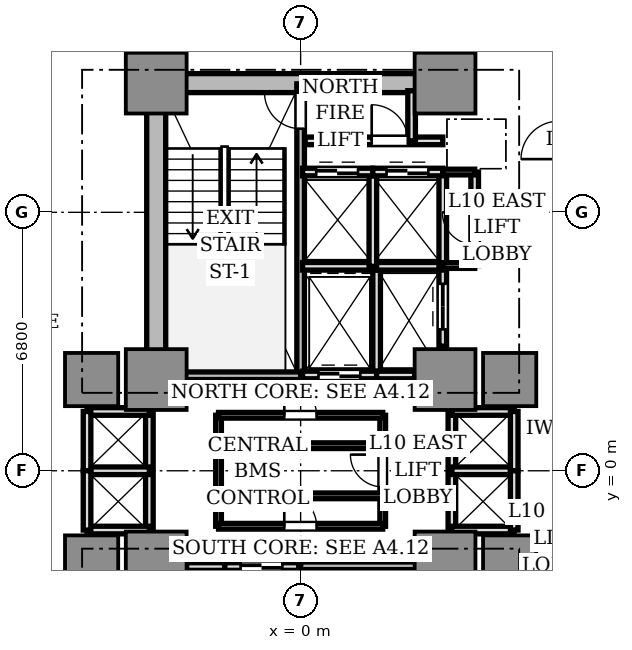
"""IFC4 building model, lengths in metres.
Left out: names, types, materials, properties, quantities, classifications, styles, units other than length and angle.
Written with IfcOpenShell. Run it as: python <this file> out.ifc"""

import sys

from ifc_helpers import new_model, si_unit, direction, frame, frame_2d, origin, origin_2d, place, context, subcontext, project, spatial, rectangle, extrude, source, transform, mapped, element, fill, save


model = new_model("IFC4")
c1 = context("Model", 3, precision=1e-05, world=origin(), true_north=direction((0.0, 1.0)))
c2 = subcontext(c1, "Body", "Model", "MODEL_VIEW")
j1 = project(units=[si_unit("LENGTHUNIT", "METRE"), si_unit("PLANEANGLEUNIT", "RADIAN")], contexts=[c1])
p1 = place(None, origin())
s1 = spatial("IfcSite", under=j1, at=p1, CompositionType="ELEMENT")
p2 = place(p1, origin())
s2 = spatial("IfcBuilding", under=s1, at=p2, CompositionType="ELEMENT")
p3 = place(p2, frame((0.0, 0.0, 39.85)))
s3 = spatial("IfcBuildingStorey", under=s2, at=p3, CompositionType="ELEMENT", Elevation=39.85)
p4 = place(p3, frame((-3.55, 10.2, 0.0), z_axis=(0.0, 0.0, 1.0), x_axis=(1.0, 0.0, 0.0)))
e1 = element("IfcWall", 1, at=p4, inside=s3, PredefinedType="SHEAR", context=c2, shape_type="SweptSolid", body=[
    extrude(rectangle(XDim=7.1, YDim=0.5, at=frame_2d((3.55, 0.0))), origin(), (0.0, 0.0, 1.0), 3.11),
])
p5 = place(p3, frame((-3.8, 2.85, 0.0), z_axis=(0.0, 0.0, 1.0), x_axis=(0.0, 1.0, 0.0)))
e2 = element("IfcWall", 2, at=p5, inside=s3, PredefinedType="SHEAR", context=c2, shape_type="SweptSolid", body=[
    extrude(rectangle(XDim=6.9, YDim=0.5, at=frame_2d((3.45, 0.0))), origin(), (0.0, 0.0, 1.0), 3.11),
])
m1 = source(origin(), c2, "Body", "SweptSolid", [
    extrude(rectangle(XDim=1.6, YDim=1.6, at=origin_2d()), origin(), (0.0, 0.0, 1.0), 3.11),
])
for number, where, z_axis, x_axis in (
    (3, (-3.8, 2.4, 0.0), (0.0, 0.0, 1.0), (1.0, 0.0, 0.0)),
    (4, (3.8, 2.4, 0.0), (0.0, 0.0, 1.0), (1.0, 0.0, 0.0)),
    (5, (-3.8, 10.2, 0.0), (0.0, 0.0, 1.0), (1.0, 0.0, 0.0)),
    (6, (3.8, 10.2, 0.0), (0.0, 0.0, 1.0), (1.0, 0.0, 0.0)),
    (7, (-3.8, -2.4, 0.0), (0.0, 0.0, 1.0), (1.0, 0.0, 0.0)),
    (8, (3.8, -2.4, 0.0), (0.0, 0.0, 1.0), (1.0, 0.0, 0.0)),
):
    element("IfcColumn", number, at=place(p3, frame(where, z_axis=z_axis, x_axis=x_axis)), inside=s3, PredefinedType="COLUMN", context=c2, shape_type="MappedRepresentation", body=[
        mapped(m1, transform((0.0, 0.0, 0.0), scale=1.0)),
    ])
m2 = source(origin(), c2, "Body", "SweptSolid", [
    extrude(rectangle(XDim=1.4, YDim=1.4, at=origin_2d()), origin(), (0.0, 0.0, 1.0), 3.11),
])
for number, where, z_axis, x_axis in (
    (9, (5.5, 2.4, 0.0), (0.0, 0.0, 1.0), (1.0, 0.0, 0.0)),
    (10, (-5.5, 2.4, 0.0), (0.0, 0.0, 1.0), (1.0, 0.0, 0.0)),
    (11, (5.5, -2.4, 0.0), (0.0, 0.0, 1.0), (1.0, 0.0, 0.0)),
    (12, (-5.5, -2.4, 0.0), (0.0, 0.0, 1.0), (1.0, 0.0, 0.0)),
):
    element("IfcColumn", number, at=place(p3, frame(where, z_axis=z_axis, x_axis=x_axis)), inside=s3, PredefinedType="COLUMN", context=c2, shape_type="MappedRepresentation", body=[
        mapped(m2, transform((0.0, 0.0, 0.0), scale=1.0)),
    ])
p6 = place(p3, frame((0.0, 2.5, 0.0), z_axis=(0.0, 0.0, 1.0), x_axis=(0.0, 1.0, 0.0)))
e13 = element("IfcWall", 13, at=p6, inside=s3, PredefinedType="SOLIDWALL", context=c2, shape_type="SweptSolid", body=[
    extrude(rectangle(XDim=7.68, YDim=0.2, at=frame_2d((3.84, 0.0))), origin(), (0.0, 0.0, 1.0), 3.11),
])
p7 = place(p6, frame((6.5, 0.0, 0.0)))
e14 = element("IfcOpeningElement", 14, at=p7, cuts=e13, PredefinedType="OPENING", context=c2, shape_type="SweptSolid", body=[
    extrude(rectangle(XDim=0.95, YDim=2.15, at=frame_2d((0.475, 1.075))), frame((0.0, 0.11, 0.0), z_axis=(0.0, -1.0, 0.0), x_axis=(1.0, 0.0, 0.0)), (0.0, 0.0, 1.0), 0.22),
])
p8 = place(p3, frame((-3.72, 2.5, 0.0), z_axis=(0.0, 0.0, 1.0), x_axis=(1.0, 0.0, 0.0)))
e15 = element("IfcWall", 15, at=p8, inside=s3, PredefinedType="SOLIDWALL", context=c2, shape_type="SweptSolid", body=[
    extrude(rectangle(XDim=3.72, YDim=0.2, at=frame_2d((1.86, 0.0))), origin(), (0.0, 0.0, 1.0), 3.11),
])
p9 = place(p3, frame((0.0, -10.18, 0.0), z_axis=(0.0, 0.0, 1.0), x_axis=(0.0, 1.0, 0.0)))
e16 = element("IfcWall", 16, at=p9, inside=s3, PredefinedType="SOLIDWALL", context=c2, shape_type="SweptSolid", body=[
    extrude(rectangle(XDim=7.68, YDim=0.2, at=frame_2d((3.84, 0.0))), origin(), (0.0, 0.0, 1.0), 3.11),
])
p10 = place(p9, frame((0.28, 0.0, 0.0)))
e17 = element("IfcOpeningElement", 17, at=p10, cuts=e16, PredefinedType="OPENING", context=c2, shape_type="SweptSolid", body=[
    extrude(rectangle(XDim=1.1, YDim=2.15, at=frame_2d((0.55, 1.075))), frame((0.0, 0.11, 0.0), z_axis=(0.0, -1.0, 0.0), x_axis=(1.0, 0.0, 0.0)), (0.0, 0.0, 1.0), 0.22),
])
p11 = place(p3, frame((0.0, -2.5, 0.0), z_axis=(0.0, 0.0, 1.0), x_axis=(1.0, 0.0, 0.0)))
e18 = element("IfcWall", 18, at=p11, inside=s3, PredefinedType="SOLIDWALL", context=c2, shape_type="SweptSolid", body=[
    extrude(rectangle(XDim=3.72, YDim=0.2, at=frame_2d((1.86, 0.0))), origin(), (0.0, 0.0, 1.0), 3.11),
])
p12 = place(p3, frame((2.0, 2.5, 0.0), z_axis=(0.0, 0.0, 1.0), x_axis=(0.0, 1.0, 0.0)))
e19 = element("IfcWall", 19, at=p12, inside=s3, PredefinedType="SOLIDWALL", context=c2, shape_type="SweptSolid", body=[
    extrude(rectangle(XDim=2.78, YDim=0.2, at=frame_2d((1.39, 0.0))), origin(), (0.0, 0.0, 1.0), 2.66),
])
p13 = place(p3, frame((0.05, 2.52, 0.0), z_axis=(0.0, 0.0, 1.0), x_axis=(1.0, 0.0, 0.0)))
e20 = element("IfcWall", 20, at=p13, inside=s3, PredefinedType="SOLIDWALL", context=c2, shape_type="SweptSolid", body=[
    extrude(rectangle(XDim=1.95, YDim=0.2, at=frame_2d((0.975, 0.0))), origin(), (0.0, 0.0, 1.0), 2.66),
])
p14 = place(p13, frame((0.42, 0.0, 0.0)))
e21 = element("IfcOpeningElement", 21, at=p14, cuts=e20, PredefinedType="OPENING", context=c2, shape_type="SweptSolid", body=[
    extrude(rectangle(XDim=1.1, YDim=2.2, at=frame_2d((0.55, 1.1))), frame((0.0, 0.11, 0.0), z_axis=(0.0, -1.0, 0.0), x_axis=(1.0, 0.0, 0.0)), (0.0, 0.0, 1.0), 0.22),
])
p15 = place(p3, frame((-2.0, -5.28, 0.0), z_axis=(0.0, 0.0, 1.0), x_axis=(0.0, 1.0, 0.0)))
e22 = element("IfcWall", 22, at=p15, inside=s3, PredefinedType="SOLIDWALL", context=c2, shape_type="SweptSolid", body=[
    extrude(rectangle(XDim=2.78, YDim=0.2, at=frame_2d((1.39, 0.0))), origin(), (0.0, 0.0, 1.0), 2.66),
])
p16 = place(p3, frame((-2.0, -2.52, 0.0), z_axis=(0.0, 0.0, 1.0), x_axis=(1.0, 0.0, 0.0)))
e23 = element("IfcWall", 23, at=p16, inside=s3, PredefinedType="SOLIDWALL", context=c2, shape_type="SweptSolid", body=[
    extrude(rectangle(XDim=1.95, YDim=0.2, at=frame_2d((0.975, 0.0))), origin(), (0.0, 0.0, 1.0), 2.66),
])
p17 = place(p16, frame((0.42, 0.0, 0.0)))
e24 = element("IfcOpeningElement", 24, at=p17, cuts=e23, PredefinedType="OPENING", context=c2, shape_type="SweptSolid", body=[
    extrude(rectangle(XDim=1.1, YDim=2.2, at=frame_2d((0.55, 1.1))), frame((0.0, 0.11, 0.0), z_axis=(0.0, -1.0, 0.0), x_axis=(1.0, 0.0, 0.0)), (0.0, 0.0, 1.0), 0.22),
])
p18 = place(p3, frame((2.0, 2.52, 0.0), z_axis=(0.0, 0.0, 1.0), x_axis=(1.0, 0.0, 0.0)))
e25 = element("IfcWall", 25, at=p18, inside=s3, PredefinedType="SOLIDWALL", context=c2, shape_type="SweptSolid", body=[
    extrude(rectangle(XDim=1.0, YDim=0.2, at=frame_2d((0.5, 0.0))), origin(), (0.0, 0.0, 1.0), 2.66),
])
p19 = place(p3, frame((3.74, 3.28, 0.0), z_axis=(0.0, 0.0, 1.0), x_axis=(0.0, 1.0, 0.0)))
e26 = element("IfcWall", 26, at=p19, inside=s3, PredefinedType="SOLIDWALL", context=c2, shape_type="SweptSolid", body=[
    extrude(rectangle(XDim=2.08, YDim=0.2, at=frame_2d((1.04, 0.0))), origin(), (0.0, 0.0, 1.0), 2.66),
])
p20 = place(p19, frame((0.44, 0.0, 0.0)))
e27 = element("IfcOpeningElement", 27, at=p20, cuts=e26, PredefinedType="OPENING", context=c2, shape_type="SweptSolid", body=[
    extrude(rectangle(XDim=1.2, YDim=2.2, at=frame_2d((0.6, 1.1))), frame((0.0, 0.11, 0.0), z_axis=(0.0, -1.0, 0.0), x_axis=(1.0, 0.0, 0.0)), (0.0, 0.0, 1.0), 0.22),
])
p21 = place(p3, frame((-3.0, -2.52, 0.0), z_axis=(0.0, 0.0, 1.0), x_axis=(1.0, 0.0, 0.0)))
e28 = element("IfcWall", 28, at=p21, inside=s3, PredefinedType="SOLIDWALL", context=c2, shape_type="SweptSolid", body=[
    extrude(rectangle(XDim=1.0, YDim=0.2, at=frame_2d((0.5, 0.0))), origin(), (0.0, 0.0, 1.0), 2.66),
])
p22 = place(p3, frame((0.05, 5.38, 0.0), z_axis=(0.0, 0.0, 1.0), x_axis=(1.0, 0.0, 0.0)))
e29 = element("IfcWall", 29, at=p22, inside=s3, PredefinedType="SOLIDWALL", context=c2, shape_type="SweptSolid", body=[
    extrude(rectangle(XDim=3.69, YDim=0.2, at=frame_2d((1.845, 0.0))), origin(), (0.0, 0.0, 1.0), 2.66),
])
p23 = place(p3, frame((1.9, 5.38, 0.0), z_axis=(0.0, 0.0, 1.0), x_axis=(0.0, 1.0, 0.0)))
e30 = element("IfcWall", 30, at=p23, inside=s3, PredefinedType="SOLIDWALL", context=c2, shape_type="SweptSolid", body=[
    extrude(rectangle(XDim=2.48, YDim=0.2, at=frame_2d((1.24, 0.0))), origin(), (0.0, 0.0, 1.0), 2.66),
])
p24 = place(p3, frame((0.05, 7.86, 0.0), z_axis=(0.0, 0.0, 1.0), x_axis=(1.0, 0.0, 0.0)))
e31 = element("IfcWall", 31, at=p24, inside=s3, PredefinedType="SOLIDWALL", context=c2, shape_type="SweptSolid", body=[
    extrude(rectangle(XDim=1.85, YDim=0.2, at=frame_2d((0.925, 0.0))), origin(), (0.0, 0.0, 1.0), 2.66),
])
p25 = place(p24, frame((0.36, 0.0, 0.0)))
e32 = element("IfcOpeningElement", 32, at=p25, cuts=e31, PredefinedType="OPENING", context=c2, shape_type="SweptSolid", body=[
    extrude(rectangle(XDim=1.1, YDim=2.2, at=frame_2d((0.55, 1.1))), frame((0.0, 0.11, 0.0), z_axis=(0.0, -1.0, 0.0), x_axis=(1.0, 0.0, 0.0)), (0.0, 0.0, 1.0), 0.22),
])
p26 = place(p3, frame((3.74, 5.38, 0.0), z_axis=(0.0, 0.0, 1.0), x_axis=(0.0, 1.0, 0.0)))
e33 = element("IfcWall", 33, at=p26, inside=s3, PredefinedType="SOLIDWALL", context=c2, shape_type="SweptSolid", body=[
    extrude(rectangle(XDim=2.48, YDim=0.2, at=frame_2d((1.24, 0.0))), origin(), (0.0, 0.0, 1.0), 2.66),
])
p27 = place(p3, frame((1.9, 7.86, 0.0), z_axis=(0.0, 0.0, 1.0), x_axis=(1.0, 0.0, 0.0)))
e34 = element("IfcWall", 34, at=p27, inside=s3, PredefinedType="SOLIDWALL", context=c2, shape_type="SweptSolid", body=[
    extrude(rectangle(XDim=1.84, YDim=0.2, at=frame_2d((0.92, 0.0))), origin(), (0.0, 0.0, 1.0), 2.66),
])
p28 = place(p27, frame((0.36, 0.0, 0.0)))
e35 = element("IfcOpeningElement", 35, at=p28, cuts=e34, PredefinedType="OPENING", context=c2, shape_type="SweptSolid", body=[
    extrude(rectangle(XDim=1.1, YDim=2.2, at=frame_2d((0.55, 1.1))), frame((0.0, 0.11, 0.0), z_axis=(0.0, -1.0, 0.0), x_axis=(1.0, 0.0, 0.0)), (0.0, 0.0, 1.0), 0.22),
])
p29 = place(p3, frame((3.98, -1.56, 0.0), z_axis=(0.0, 0.0, 1.0), x_axis=(0.0, 1.0, 0.0)))
e36 = element("IfcWall", 36, at=p29, inside=s3, PredefinedType="SOLIDWALL", context=c2, shape_type="SweptSolid", body=[
    extrude(rectangle(XDim=3.12, YDim=0.2, at=frame_2d((1.56, 0.0))), origin(), (0.0, 0.0, 1.0), 2.18),
])
for number, where, z_axis, x_axis in (
    (37, (3.98, 1.56, 0.0), (0.0, 0.0, 1.0), (1.0, 0.0, 0.0)),
    (38, (3.98, -1.56, 0.0), (0.0, 0.0, 1.0), (1.0, 0.0, 0.0)),
    (39, (3.98, 0.0, 0.0), (0.0, 0.0, 1.0), (1.0, 0.0, 0.0)),
):
    element("IfcWall", number, at=place(p3, frame(where, z_axis=z_axis, x_axis=x_axis)), inside=s3, PredefinedType="SOLIDWALL", context=c2, shape_type="SweptSolid", body=[
        extrude(rectangle(XDim=1.64, YDim=0.2, at=frame_2d((0.82, 0.0))), origin(), (0.0, 0.0, 1.0), 2.66),
    ])
for number, where, z_axis, x_axis in (
    (40, (5.62, 0.0, 0.0), (0.0, 0.0, 1.0), (0.0, 1.0, 0.0)),
    (41, (5.62, -1.56, 0.0), (0.0, 0.0, 1.0), (0.0, 1.0, 0.0)),
):
    element("IfcWall", number, at=place(p3, frame(where, z_axis=z_axis, x_axis=x_axis)), inside=s3, PredefinedType="SOLIDWALL", context=c2, shape_type="SweptSolid", body=[
        extrude(rectangle(XDim=1.56, YDim=0.2, at=frame_2d((0.78, 0.0))), origin(), (0.0, 0.0, 1.0), 2.66),
    ])
p30 = place(p3, frame((-3.98, -1.56, 0.0), z_axis=(0.0, 0.0, 1.0), x_axis=(0.0, 1.0, 0.0)))
e42 = element("IfcWall", 42, at=p30, inside=s3, PredefinedType="SOLIDWALL", context=c2, shape_type="SweptSolid", body=[
    extrude(rectangle(XDim=3.12, YDim=0.2, at=frame_2d((1.56, 0.0))), origin(), (0.0, 0.0, 1.0), 2.18),
])
for number, where, z_axis, x_axis in (
    (43, (-5.62, 1.56, 0.0), (0.0, 0.0, 1.0), (1.0, 0.0, 0.0)),
    (44, (-5.62, -1.56, 0.0), (0.0, 0.0, 1.0), (1.0, 0.0, 0.0)),
    (45, (-5.62, 0.0, 0.0), (0.0, 0.0, 1.0), (1.0, 0.0, 0.0)),
):
    element("IfcWall", number, at=place(p3, frame(where, z_axis=z_axis, x_axis=x_axis)), inside=s3, PredefinedType="SOLIDWALL", context=c2, shape_type="SweptSolid", body=[
        extrude(rectangle(XDim=1.64, YDim=0.2, at=frame_2d((0.82, 0.0))), origin(), (0.0, 0.0, 1.0), 2.66),
    ])
for number, where, z_axis, x_axis in (
    (46, (-5.62, 0.0, 0.0), (0.0, 0.0, 1.0), (0.0, 1.0, 0.0)),
    (47, (-5.62, -1.56, 0.0), (0.0, 0.0, 1.0), (0.0, 1.0, 0.0)),
):
    element("IfcWall", number, at=place(p3, frame(where, z_axis=z_axis, x_axis=x_axis)), inside=s3, PredefinedType="SOLIDWALL", context=c2, shape_type="SweptSolid", body=[
        extrude(rectangle(XDim=1.56, YDim=0.2, at=frame_2d((0.78, 0.0))), origin(), (0.0, 0.0, 1.0), 2.66),
    ])
p31 = place(p3, frame((0.12, 8.68, 0.0), z_axis=(0.0, 0.0, 1.0), x_axis=(1.0, 0.0, 0.0)))
e48 = element("IfcWall", 48, at=p31, inside=s3, PredefinedType="SOLIDWALL", context=c2, shape_type="SweptSolid", body=[
    extrude(rectangle(XDim=3.62, YDim=0.2, at=frame_2d((1.81, 0.0))), origin(), (0.0, 0.0, 1.0), 2.66),
])
p32 = place(p31, frame((1.75, 0.0, 0.0)))
e49 = element("IfcOpeningElement", 49, at=p32, cuts=e48, PredefinedType="OPENING", context=c2, shape_type="SweptSolid", body=[
    extrude(rectangle(XDim=0.95, YDim=2.15, at=frame_2d((0.475, 1.075))), frame((0.0, 0.11, 0.0), z_axis=(0.0, -1.0, 0.0), x_axis=(1.0, 0.0, 0.0)), (0.0, 0.0, 1.0), 0.22),
])
p33 = place(p3, frame((2.92, 8.68, 0.0), z_axis=(0.0, 0.0, 1.0), x_axis=(0.0, 1.0, 0.0)))
e50 = element("IfcWall", 50, at=p33, inside=s3, PredefinedType="SOLIDWALL", context=c2, shape_type="SweptSolid", body=[
    extrude(rectangle(XDim=1.32, YDim=0.2, at=frame_2d((0.66, 0.0))), origin(), (0.0, 0.0, 1.0), 2.66),
])
p34 = place(p3, frame((4.58, 5.4, 0.0), z_axis=(0.0, 0.0, 1.0), x_axis=(0.0, 1.0, 0.0)))
e51 = element("IfcWall", 51, at=p34, inside=s3, PredefinedType="SOLIDWALL", context=c2, shape_type="SweptSolid", body=[
    extrude(rectangle(XDim=2.46, YDim=0.2, at=frame_2d((1.23, 0.0))), origin(), (0.0, 0.0, 1.0), 2.66),
])
p35 = place(p34, frame((0.55, 0.0, 0.0)))
e52 = element("IfcOpeningElement", 52, at=p35, cuts=e51, PredefinedType="OPENING", context=c2, shape_type="SweptSolid", body=[
    extrude(rectangle(XDim=0.85, YDim=2.1, at=frame_2d((0.425, 1.05))), frame((0.0, 0.11, 0.0), z_axis=(0.0, -1.0, 0.0), x_axis=(1.0, 0.0, 0.0)), (0.0, 0.0, 1.0), 0.22),
])
for number, where, z_axis, x_axis in (
    (53, (3.74, 5.4, 0.0), (0.0, 0.0, 1.0), (1.0, 0.0, 0.0)),
    (54, (3.74, 7.86, 0.0), (0.0, 0.0, 1.0), (1.0, 0.0, 0.0)),
):
    element("IfcWall", number, at=place(p3, frame(where, z_axis=z_axis, x_axis=x_axis)), inside=s3, PredefinedType="PARTITIONING", context=c2, shape_type="SweptSolid", body=[
        extrude(rectangle(XDim=0.84, YDim=0.15, at=frame_2d((0.42, 0.0))), origin(), (0.0, 0.0, 1.0), 2.66),
    ])
p36 = place(p3, frame((2.16, -1.46, 0.0), z_axis=(0.0, 0.0, 1.0), x_axis=(0.0, 1.0, 0.0)))
e55 = element("IfcWall", 55, at=p36, inside=s3, PredefinedType="PARTITIONING", context=c2, shape_type="SweptSolid", body=[
    extrude(rectangle(XDim=2.92, YDim=0.15, at=frame_2d((1.46, 0.0))), origin(), (0.0, 0.0, 1.0), 2.66),
])
p37 = place(p36, frame((1.035, 0.0, 0.0)))
e56 = element("IfcOpeningElement", 56, at=p37, cuts=e55, PredefinedType="OPENING", context=c2, shape_type="SweptSolid", body=[
    extrude(rectangle(XDim=0.85, YDim=2.1, at=frame_2d((0.425, 1.05))), frame((0.0, 0.085, 0.0), z_axis=(0.0, -1.0, 0.0), x_axis=(1.0, 0.0, 0.0)), (0.0, 0.0, 1.0), 0.17),
])
p38 = place(p3, frame((-2.16, -1.46, 0.0), z_axis=(0.0, 0.0, 1.0), x_axis=(0.0, 1.0, 0.0)))
e57 = element("IfcWall", 57, at=p38, inside=s3, PredefinedType="PARTITIONING", context=c2, shape_type="SweptSolid", body=[
    extrude(rectangle(XDim=2.92, YDim=0.15, at=frame_2d((1.46, 0.0))), origin(), (0.0, 0.0, 1.0), 2.66),
])
p39 = place(p3, frame((-2.16, 1.46, 0.0), z_axis=(0.0, 0.0, 1.0), x_axis=(1.0, 0.0, 0.0)))
e58 = element("IfcWall", 58, at=p39, inside=s3, PredefinedType="PARTITIONING", context=c2, shape_type="SweptSolid", body=[
    extrude(rectangle(XDim=4.32, YDim=0.15, at=frame_2d((2.16, 0.0))), origin(), (0.0, 0.0, 1.0), 2.66),
])
p40 = place(p39, frame((1.73, 0.0, 0.0)))
e59 = element("IfcOpeningElement", 59, at=p40, cuts=e58, PredefinedType="OPENING", context=c2, shape_type="SweptSolid", body=[
    extrude(rectangle(XDim=0.85, YDim=2.1, at=frame_2d((0.425, 1.05))), frame((0.0, 0.085, 0.0), z_axis=(0.0, -1.0, 0.0), x_axis=(1.0, 0.0, 0.0)), (0.0, 0.0, 1.0), 0.17),
])
p41 = place(p3, frame((-2.16, -1.46, 0.0), z_axis=(0.0, 0.0, 1.0), x_axis=(1.0, 0.0, 0.0)))
e60 = element("IfcWall", 60, at=p41, inside=s3, PredefinedType="PARTITIONING", context=c2, shape_type="SweptSolid", body=[
    extrude(rectangle(XDim=4.32, YDim=0.15, at=frame_2d((2.16, 0.0))), origin(), (0.0, 0.0, 1.0), 2.66),
])
p42 = place(p41, frame((1.73, 0.0, 0.0)))
e61 = element("IfcOpeningElement", 61, at=p42, cuts=e60, PredefinedType="OPENING", context=c2, shape_type="SweptSolid", body=[
    extrude(rectangle(XDim=0.85, YDim=2.1, at=frame_2d((0.425, 1.05))), frame((0.0, 0.085, 0.0), z_axis=(0.0, -1.0, 0.0), x_axis=(1.0, 0.0, 0.0)), (0.0, 0.0, 1.0), 0.17),
])
for number, where, z_axis, x_axis in (
    (62, (-2.16, 0.66, 0.0), (0.0, 0.0, 1.0), (1.0, 0.0, 0.0)),
    (63, (-2.16, -0.66, 0.0), (0.0, 0.0, 1.0), (1.0, 0.0, 0.0)),
):
    element("IfcWall", number, at=place(p3, frame(where, z_axis=z_axis, x_axis=x_axis)), inside=s3, PredefinedType="PARTITIONING", context=c2, shape_type="SweptSolid", body=[
        extrude(rectangle(XDim=4.32, YDim=0.15, at=frame_2d((2.16, 0.0))), origin(), (0.0, 0.0, 1.0), 2.66),
    ])
m3 = source(origin(), c2, "Body", "SweptSolid", [
    extrude(rectangle(XDim=1.1, YDim=0.05, at=origin_2d()), origin(), (0.0, 0.0, 1.0), 2.2),
])
p43 = place(p14, frame((0.55, 0.0, 0.0)))
e64 = element("IfcDoor", 64, at=p43, inside=s3, OperationType="DOUBLE_DOOR_SLIDING", PredefinedType="DOOR", context=c2, shape_type="MappedRepresentation", body=[
    mapped(m3, transform((0.0, 0.0, 0.0), scale=1.0)),
])
fill(e21, e64)
p44 = place(p17, frame((0.55, 0.0, 0.0)))
e65 = element("IfcDoor", 65, at=p44, inside=s3, OperationType="DOUBLE_DOOR_SLIDING", PredefinedType="DOOR", context=c2, shape_type="MappedRepresentation", body=[
    mapped(m3, transform((0.0, 0.0, 0.0), scale=1.0)),
])
fill(e24, e65)
m4 = source(origin(), c2, "Body", "SweptSolid", [
    extrude(rectangle(XDim=1.2, YDim=0.05, at=origin_2d()), origin(), (0.0, 0.0, 1.0), 2.2),
])
p45 = place(p20, frame((0.6, 0.0, 0.0)))
e66 = element("IfcDoor", 66, at=p45, inside=s3, OperationType="DOUBLE_DOOR_SLIDING", PredefinedType="DOOR", context=c2, shape_type="MappedRepresentation", body=[
    mapped(m4, transform((0.0, 0.0, 0.0), scale=1.0)),
])
fill(e27, e66)
p46 = place(p25, frame((0.55, 0.0, 0.0)))
e67 = element("IfcDoor", 67, at=p46, inside=s3, OperationType="DOUBLE_DOOR_SLIDING", PredefinedType="DOOR", context=c2, shape_type="MappedRepresentation", body=[
    mapped(m3, transform((0.0, 0.0, 0.0), scale=1.0)),
])
fill(e32, e67)
p47 = place(p28, frame((0.55, 0.0, 0.0)))
e68 = element("IfcDoor", 68, at=p47, inside=s3, OperationType="DOUBLE_DOOR_SLIDING", PredefinedType="DOOR", context=c2, shape_type="MappedRepresentation", body=[
    mapped(m3, transform((0.0, 0.0, 0.0), scale=1.0)),
])
fill(e35, e68)
m5 = source(origin(), c2, "Body", "SweptSolid", [
    extrude(rectangle(XDim=0.95, YDim=0.05, at=origin_2d()), origin(), (0.0, 0.0, 1.0), 2.15),
])
p48 = place(p7, frame((0.475, 0.0, 0.0)))
e69 = element("IfcDoor", 69, at=p48, inside=s3, OperationType="SINGLE_SWING_RIGHT", PredefinedType="DOOR", context=c2, shape_type="MappedRepresentation", body=[
    mapped(m5, transform((0.0, 0.0, 0.0), scale=1.0)),
])
fill(e14, e69)
p49 = place(p32, frame((0.475, 0.0, 0.0)))
e70 = element("IfcDoor", 70, at=p49, inside=s3, OperationType="SINGLE_SWING_LEFT", PredefinedType="DOOR", context=c2, shape_type="MappedRepresentation", body=[
    mapped(m5, transform((0.0, 0.0, 0.0), scale=1.0)),
])
fill(e49, e70)
m6 = source(origin(), c2, "Body", "SweptSolid", [
    extrude(rectangle(XDim=0.85, YDim=0.05, at=origin_2d()), origin(), (0.0, 0.0, 1.0), 2.1),
])
p50 = place(p35, frame((0.425, 0.0, 0.0)))
e71 = element("IfcDoor", 71, at=p50, inside=s3, OperationType="SINGLE_SWING_RIGHT", PredefinedType="DOOR", context=c2, shape_type="MappedRepresentation", body=[
    mapped(m6, transform((0.0, 0.0, 0.0), scale=1.0)),
])
fill(e52, e71)
p51 = place(p40, frame((0.425, 0.0, 0.0)))
e72 = element("IfcDoor", 72, at=p51, inside=s3, OperationType="SINGLE_SWING_LEFT", PredefinedType="DOOR", context=c2, shape_type="MappedRepresentation", body=[
    mapped(m6, transform((0.0, 0.0, 0.0), scale=1.0)),
])
fill(e59, e72)
p52 = place(p37, frame((0.425, 0.0, 0.0)))
e73 = element("IfcDoor", 73, at=p52, inside=s3, OperationType="SINGLE_SWING_RIGHT", PredefinedType="DOOR", context=c2, shape_type="MappedRepresentation", body=[
    mapped(m6, transform((0.0, 0.0, 0.0), scale=1.0)),
])
fill(e56, e73)
p53 = place(p42, frame((0.425, 0.0, 0.0)))
e74 = element("IfcDoor", 74, at=p53, inside=s3, OperationType="SINGLE_SWING_LEFT", PredefinedType="DOOR", context=c2, shape_type="MappedRepresentation", body=[
    mapped(m6, transform((0.0, 0.0, 0.0), scale=1.0)),
])
fill(e61, e74)
save(model, sys.argv[1])
